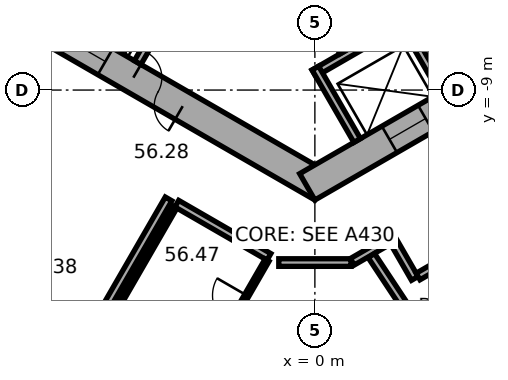
"""IFC4 building model, lengths in metres.
Left out: names, types, materials, properties, quantities, classifications, styles, units other than length and angle.
Written with IfcOpenShell. Run it as: python <this file> out.ifc"""

import sys

from ifc_helpers import new_model, si_unit, direction, frame, frame_2d, origin, place, context, subcontext, project, spatial, rectangle, extrude, element, fill, save


model = new_model("IFC4")
c1 = context("Model", 3, precision=1e-05, world=origin(), true_north=direction((0.0, 1.0)))
c2 = subcontext(c1, "Body", "Model", "MODEL_VIEW")
j1 = project(units=[si_unit("LENGTHUNIT", "METRE"), si_unit("PLANEANGLEUNIT", "RADIAN")], contexts=[c1])
p1 = place(None, origin())
s1 = spatial("IfcSite", under=j1, at=p1, CompositionType="ELEMENT")
p2 = place(p1, origin())
s2 = spatial("IfcBuilding", under=s1, at=p2, CompositionType="ELEMENT")
p3 = place(p2, frame((0.0, 0.0, 229.1)))
s3 = spatial("IfcBuildingStorey", under=s2, at=p3, CompositionType="ELEMENT", Elevation=229.1)
p4 = place(p3, frame((-10.1, -5.6, 0.0), z_axis=(0.0, 0.0, 1.0), x_axis=(0.866023897231, -0.500002609418, 0.0)))
e1 = element("IfcWall", 1, at=p4, inside=s3, PredefinedType="SHEAR", context=c2, shape_type="SweptSolid", body=[
    extrude(rectangle(XDim=11.894, YDim=0.8, at=frame_2d((5.947, 0.0))), origin(), (0.0, 0.0, 1.0), 3.7),
])
p5 = place(p4, frame((6.147, 0.0, 0.0)))
e2 = element("IfcOpeningElement", 2, at=p5, cuts=e1, PredefinedType="OPENING", context=c2, shape_type="SweptSolid", body=[
    extrude(rectangle(XDim=1.5, YDim=2.1, at=frame_2d((0.75, 1.05))), frame((0.0, 0.41, 0.0), z_axis=(0.0, -1.0, 0.0), x_axis=(1.0, 0.0, 0.0)), (0.0, 0.0, 1.0), 0.82),
])
p6 = place(p4, frame((1.597, 0.0, 0.0)))
e3 = element("IfcOpeningElement", 3, at=p6, cuts=e1, PredefinedType="OPENING", context=c2, shape_type="SweptSolid", body=[
    extrude(rectangle(XDim=1.1, YDim=2.1, at=frame_2d((0.55, 1.05))), frame((0.0, 0.41, 0.0), z_axis=(0.0, -1.0, 0.0), x_axis=(1.0, 0.0, 0.0)), (0.0, 0.0, 1.0), 0.82),
])
p7 = place(p4, frame((4.197, 0.0, 0.0)))
e4 = element("IfcOpeningElement", 4, at=p7, cuts=e1, PredefinedType="OPENING", context=c2, shape_type="SweptSolid", body=[
    extrude(rectangle(XDim=1.1, YDim=2.1, at=frame_2d((0.55, 1.05))), frame((0.0, 0.41, 0.0), z_axis=(0.0, -1.0, 0.0), x_axis=(1.0, 0.0, 0.0)), (0.0, 0.0, 1.0), 0.82),
])
p8 = place(p3, frame((-0.2, -11.547, 0.0), z_axis=(0.0, 0.0, 1.0), x_axis=(0.866023897231, 0.500002609418, 0.0)))
e5 = element("IfcWall", 5, at=p8, inside=s3, PredefinedType="SHEAR", context=c2, shape_type="SweptSolid", body=[
    extrude(rectangle(XDim=11.894, YDim=0.8, at=frame_2d((5.947, 0.0))), origin(), (0.0, 0.0, 1.0), 3.7),
])
p9 = place(p8, frame((2.497, 0.0, 0.0)))
e6 = element("IfcOpeningElement", 6, at=p9, cuts=e5, PredefinedType="OPENING", context=c2, shape_type="SweptSolid", body=[
    extrude(rectangle(XDim=1.1, YDim=2.1, at=frame_2d((0.55, 1.05))), frame((0.0, 0.41, 0.0), z_axis=(0.0, -1.0, 0.0), x_axis=(1.0, 0.0, 0.0)), (0.0, 0.0, 1.0), 0.82),
])
p10 = place(p8, frame((5.097, 0.0, 0.0)))
e7 = element("IfcOpeningElement", 7, at=p10, cuts=e5, PredefinedType="OPENING", context=c2, shape_type="SweptSolid", body=[
    extrude(rectangle(XDim=1.1, YDim=2.1, at=frame_2d((0.55, 1.05))), frame((0.0, 0.41, 0.0), z_axis=(0.0, -1.0, 0.0), x_axis=(1.0, 0.0, 0.0)), (0.0, 0.0, 1.0), 0.82),
])
p11 = place(p8, frame((7.697, 0.0, 0.0)))
e8 = element("IfcOpeningElement", 8, at=p11, cuts=e5, PredefinedType="OPENING", context=c2, shape_type="SweptSolid", body=[
    extrude(rectangle(XDim=1.1, YDim=2.1, at=frame_2d((0.55, 1.05))), frame((0.0, 0.41, 0.0), z_axis=(0.0, -1.0, 0.0), x_axis=(1.0, 0.0, 0.0)), (0.0, 0.0, 1.0), 0.82),
])
p12 = place(p3, frame((-17.664, -13.415, 0.0), z_axis=(0.0, 0.0, 1.0), x_axis=(0.866026555358, -0.49999800541, 0.0)))
e9 = element("IfcWall", 9, at=p12, inside=s3, PredefinedType="STANDARD", context=c2, shape_type="SweptSolid", body=[
    extrude(rectangle(XDim=18.841, YDim=0.2, at=frame_2d((9.421, 0.0))), origin(), (0.0, 0.0, 1.0), 3.7),
])
p13 = place(p12, frame((1.254, 0.0, 0.9)))
e10 = element("IfcOpeningElement", 10, at=p13, cuts=e9, PredefinedType="OPENING", context=c2, shape_type="SweptSolid", body=[
    extrude(rectangle(XDim=2.2, YDim=2.0, at=frame_2d((1.1, 1.0))), frame((0.0, 0.11, 0.0), z_axis=(0.0, -1.0, 0.0), x_axis=(1.0, 0.0, 0.0)), (0.0, 0.0, 1.0), 0.22),
])
p14 = place(p12, frame((4.788, 0.0, 0.9)))
e11 = element("IfcOpeningElement", 11, at=p14, cuts=e9, PredefinedType="OPENING", context=c2, shape_type="SweptSolid", body=[
    extrude(rectangle(XDim=2.2, YDim=2.0, at=frame_2d((1.1, 1.0))), frame((0.0, 0.11, 0.0), z_axis=(0.0, -1.0, 0.0), x_axis=(1.0, 0.0, 0.0)), (0.0, 0.0, 1.0), 0.22),
])
p15 = place(p12, frame((8.322, 0.0, 0.9)))
e12 = element("IfcOpeningElement", 12, at=p15, cuts=e9, PredefinedType="OPENING", context=c2, shape_type="SweptSolid", body=[
    extrude(rectangle(XDim=2.2, YDim=2.0, at=frame_2d((1.1, 1.0))), frame((0.0, 0.11, 0.0), z_axis=(0.0, -1.0, 0.0), x_axis=(1.0, 0.0, 0.0)), (0.0, 0.0, 1.0), 0.22),
])
p16 = place(p12, frame((11.855, 0.0, 0.9)))
e13 = element("IfcOpeningElement", 13, at=p16, cuts=e9, PredefinedType="OPENING", context=c2, shape_type="SweptSolid", body=[
    extrude(rectangle(XDim=2.2, YDim=2.0, at=frame_2d((1.1, 1.0))), frame((0.0, 0.11, 0.0), z_axis=(0.0, -1.0, 0.0), x_axis=(1.0, 0.0, 0.0)), (0.0, 0.0, 1.0), 0.22),
])
p17 = place(p12, frame((15.389, 0.0, 0.9)))
e14 = element("IfcOpeningElement", 14, at=p17, cuts=e9, PredefinedType="OPENING", context=c2, shape_type="SweptSolid", body=[
    extrude(rectangle(XDim=2.2, YDim=2.0, at=frame_2d((1.1, 1.0))), frame((0.0, 0.11, 0.0), z_axis=(0.0, -1.0, 0.0), x_axis=(1.0, 0.0, 0.0)), (0.0, 0.0, 1.0), 0.22),
])
p18 = place(p3, frame((2.739, -22.711, 0.0), z_axis=(0.0, 0.0, 1.0), x_axis=(0.833885723098, 0.551937134838, 0.0)))
e15 = element("IfcWall", 15, at=p18, inside=s3, PredefinedType="STANDARD", context=c2, shape_type="SweptSolid", body=[
    extrude(rectangle(XDim=18.841, YDim=0.2, at=frame_2d((9.421, 0.0))), origin(), (0.0, 0.0, 1.0), 3.7),
])
p19 = place(p18, frame((1.252, 0.0, 0.9)))
e16 = element("IfcOpeningElement", 16, at=p19, cuts=e15, PredefinedType="OPENING", context=c2, shape_type="SweptSolid", body=[
    extrude(rectangle(XDim=2.2, YDim=2.0, at=frame_2d((1.1, 1.0))), frame((0.0, 0.11, 0.0), z_axis=(0.0, -1.0, 0.0), x_axis=(1.0, 0.0, 0.0)), (0.0, 0.0, 1.0), 0.22),
])
p20 = place(p18, frame((4.786, 0.0, 0.9)))
e17 = element("IfcOpeningElement", 17, at=p20, cuts=e15, PredefinedType="OPENING", context=c2, shape_type="SweptSolid", body=[
    extrude(rectangle(XDim=2.2, YDim=2.0, at=frame_2d((1.1, 1.0))), frame((0.0, 0.11, 0.0), z_axis=(0.0, -1.0, 0.0), x_axis=(1.0, 0.0, 0.0)), (0.0, 0.0, 1.0), 0.22),
])
p21 = place(p18, frame((8.32, 0.0, 0.9)))
e18 = element("IfcOpeningElement", 18, at=p21, cuts=e15, PredefinedType="OPENING", context=c2, shape_type="SweptSolid", body=[
    extrude(rectangle(XDim=2.2, YDim=2.0, at=frame_2d((1.1, 1.0))), frame((0.0, 0.11, 0.0), z_axis=(0.0, -1.0, 0.0), x_axis=(1.0, 0.0, 0.0)), (0.0, 0.0, 1.0), 0.22),
])
p22 = place(p18, frame((11.854, 0.0, 0.9)))
e19 = element("IfcOpeningElement", 19, at=p22, cuts=e15, PredefinedType="OPENING", context=c2, shape_type="SweptSolid", body=[
    extrude(rectangle(XDim=2.2, YDim=2.0, at=frame_2d((1.1, 1.0))), frame((0.0, 0.11, 0.0), z_axis=(0.0, -1.0, 0.0), x_axis=(1.0, 0.0, 0.0)), (0.0, 0.0, 1.0), 0.22),
])
p23 = place(p18, frame((15.387, 0.0, 0.9)))
e20 = element("IfcOpeningElement", 20, at=p23, cuts=e15, PredefinedType="OPENING", context=c2, shape_type="SweptSolid", body=[
    extrude(rectangle(XDim=2.2, YDim=2.0, at=frame_2d((1.1, 1.0))), frame((0.0, 0.11, 0.0), z_axis=(0.0, -1.0, 0.0), x_axis=(1.0, 0.0, 0.0)), (0.0, 0.0, 1.0), 0.22),
])
p24 = place(p3, frame((-3.563, -6.372, 0.0), z_axis=(0.0, 0.0, 1.0), x_axis=(-0.499994660107, -0.866028486751, 0.0)))
e21 = element("IfcWall", 21, at=p24, inside=s3, PredefinedType="PARTITIONING", context=c2, shape_type="SweptSolid", body=[
    extrude(rectangle(XDim=2.2, YDim=0.2, at=frame_2d((1.1, 0.0))), origin(), (0.0, 0.0, 1.0), 3.42),
])
p25 = place(p3, frame((-0.024, -8.559, 0.0), z_axis=(0.0, 0.0, 1.0), x_axis=(0.866026010844, 0.49999894854, 0.0)))
e22 = element("IfcWall", 22, at=p25, inside=s3, PredefinedType="PARTITIONING", context=c2, shape_type="SweptSolid", body=[
    extrude(rectangle(XDim=8.0, YDim=0.2, at=frame_2d((4.0, 0.0))), origin(), (0.0, 0.0, 1.0), 3.42),
])
for number, where, z_axis, x_axis in (
    (23, (0.013, -8.422, 0.0), (0.0, 0.0, 1.0), (0.5, -0.866, 0.0)),
    (24, (2.264, -7.122, 0.0), (0.0, 0.0, 1.0), (0.5, -0.866, 0.0)),
):
    element("IfcWall", number, at=place(p3, frame(where, z_axis=z_axis, x_axis=x_axis)), inside=s3, PredefinedType="PARTITIONING", context=c2, shape_type="SweptSolid", body=[
        extrude(rectangle(XDim=2.2, YDim=0.2, at=frame_2d((1.1, 0.0))), origin(), (0.0, 0.0, 1.0), 3.42),
    ])
p26 = place(p3, frame((-1.558, -3.902, 0.0), z_axis=(0.0, 0.0, 1.0), x_axis=(0.499977259774, -0.866038532462, 0.0)))
e25 = element("IfcWall", 25, at=p26, inside=s3, PredefinedType="SHEAR", context=c2, shape_type="SweptSolid", body=[
    extrude(rectangle(XDim=4.7, YDim=0.3, at=frame_2d((2.35, 0.0))), origin(), (0.0, 0.0, 1.0), 3.42),
])
p27 = place(p26, frame((0.8, 0.0, 0.0)))
e26 = element("IfcOpeningElement", 26, at=p27, cuts=e25, PredefinedType="OPENING", context=c2, shape_type="SweptSolid", body=[
    extrude(rectangle(XDim=1.2, YDim=2.1, at=frame_2d((0.6, 1.05))), frame((0.0, 0.16, 0.0), z_axis=(0.0, -1.0, 0.0), x_axis=(1.0, 0.0, 0.0)), (0.0, 0.0, 1.0), 0.32),
])
p28 = place(p3, frame((-7.525, -18.23, 0.0), z_axis=(0.0, 0.0, 1.0), x_axis=(0.499983153418, 0.866035129944, 0.0)))
e27 = element("IfcWall", 27, at=p28, inside=s3, PredefinedType="PARTITIONING", context=c2, shape_type="SweptSolid", body=[
    extrude(rectangle(XDim=7.35, YDim=0.2, at=frame_2d((3.675, 0.0))), origin(), (0.0, 0.0, 1.0), 3.42),
])
p29 = place(p28, frame((2.975, 0.0, 0.0)))
e28 = element("IfcOpeningElement", 28, at=p29, cuts=e27, PredefinedType="OPENING", context=c2, shape_type="SweptSolid", body=[
    extrude(rectangle(XDim=1.0, YDim=2.1, at=frame_2d((0.5, 1.05))), frame((0.0, 0.11, 0.0), z_axis=(0.0, -1.0, 0.0), x_axis=(1.0, 0.0, 0.0)), (0.0, 0.0, 1.0), 0.22),
])
p30 = place(p3, frame((-5.233, -14.761, 0.0), z_axis=(0.0, 0.0, 1.0), x_axis=(0.499967891604, 0.866043940782, 0.0)))
e29 = element("IfcWall", 29, at=p30, inside=s3, PredefinedType="PARTITIONING", context=c2, shape_type="SweptSolid", body=[
    extrude(rectangle(XDim=3.1, YDim=0.12, at=frame_2d((1.55, 0.0))), origin(), (0.0, 0.0, 1.0), 3.42),
])
p31 = place(p3, frame((-3.634, -11.99, 0.0), z_axis=(0.0, 0.0, 1.0), x_axis=(0.866018616679, -0.500011755427, 0.0)))
e30 = element("IfcWall", 30, at=p31, inside=s3, PredefinedType="PARTITIONING", context=c2, shape_type="SweptSolid", body=[
    extrude(rectangle(XDim=2.8, YDim=0.2, at=frame_2d((1.4, 0.0))), origin(), (0.0, 0.0, 1.0), 3.42),
])
p32 = place(p3, frame((-1.259, -13.476, 0.0), z_axis=(0.0, 0.0, 1.0), x_axis=(-0.500026023896, -0.86601037836, 0.0)))
e31 = element("IfcWall", 31, at=p32, inside=s3, PredefinedType="PARTITIONING", context=c2, shape_type="SweptSolid", body=[
    extrude(rectangle(XDim=3.04, YDim=0.12, at=frame_2d((1.52, 0.0))), origin(), (0.0, 0.0, 1.0), 3.42),
])
p33 = place(p32, frame((1.07, 0.0, 0.0)))
e32 = element("IfcOpeningElement", 32, at=p33, cuts=e31, PredefinedType="OPENING", context=c2, shape_type="SweptSolid", body=[
    extrude(rectangle(XDim=0.9, YDim=2.1, at=frame_2d((0.45, 1.05))), frame((0.0, 0.07, 0.0), z_axis=(0.0, -1.0, 0.0), x_axis=(1.0, 0.0, 0.0)), (0.0, 0.0, 1.0), 0.14),
])
p34 = place(p3, frame((-0.95, -13.539, 0.0), z_axis=(0.0, 0.0, 1.0), x_axis=(1.0, 0.0, 0.0)))
e33 = element("IfcWall", 33, at=p34, inside=s3, PredefinedType="PARTITIONING", context=c2, shape_type="SweptSolid", body=[
    extrude(rectangle(XDim=1.9, YDim=0.2, at=frame_2d((0.95, 0.0))), origin(), (0.0, 0.0, 1.0), 3.42),
])
p35 = place(p3, frame((0.985, -13.519, 0.0), z_axis=(0.0, 0.0, 1.0), x_axis=(0.866054082991, 0.499950322867, 0.0)))
e34 = element("IfcWall", 34, at=p35, inside=s3, PredefinedType="PARTITIONING", context=c2, shape_type="SweptSolid", body=[
    extrude(rectangle(XDim=1.206, YDim=0.2, at=frame_2d((0.603, 0.0))), origin(), (0.0, 0.0, 1.0), 3.42),
])
p36 = place(p3, frame((2.079, -13.003, 0.0), z_axis=(0.0, 0.0, 1.0), x_axis=(0.500074377092, -0.865982457891, 0.0)))
e35 = element("IfcWall", 35, at=p36, inside=s3, PredefinedType="PARTITIONING", context=c2, shape_type="SweptSolid", body=[
    extrude(rectangle(XDim=1.101, YDim=0.2, at=frame_2d((0.55, 0.0))), origin(), (0.0, 0.0, 1.0), 3.42),
])
p37 = place(p3, frame((2.716, -13.906, 0.0), z_axis=(0.0, 0.0, 1.0), x_axis=(0.866040290674, 0.499974214264, 0.0)))
e36 = element("IfcWall", 36, at=p37, inside=s3, PredefinedType="PARTITIONING", context=c2, shape_type="SweptSolid", body=[
    extrude(rectangle(XDim=8.702, YDim=0.2, at=frame_2d((4.351, 0.0))), origin(), (0.0, 0.0, 1.0), 3.42),
])
p38 = place(p37, frame((2.679, 0.0, 0.0)))
e37 = element("IfcOpeningElement", 37, at=p38, cuts=e36, PredefinedType="OPENING", context=c2, shape_type="SweptSolid", body=[
    extrude(rectangle(XDim=1.0, YDim=2.1, at=frame_2d((0.5, 1.05))), frame((0.0, 0.11, 0.0), z_axis=(0.0, -1.0, 0.0), x_axis=(1.0, 0.0, 0.0)), (0.0, 0.0, 1.0), 0.22),
])
p39 = place(p3, frame((5.677, -19.687, 0.0), z_axis=(0.0, 0.0, 1.0), x_axis=(-0.551936619203, 0.833886064389, 0.0)))
e38 = element("IfcWall", 38, at=p39, inside=s3, PredefinedType="PARTITIONING", context=c2, shape_type="SweptSolid", body=[
    extrude(rectangle(XDim=7.592, YDim=0.2, at=frame_2d((3.796, 0.0))), origin(), (0.0, 0.0, 1.0), 3.42),
])
p40 = place(p5, origin())
e39 = element("IfcDoor", 39, at=p40, inside=s3, OperationType="DOUBLE_DOOR_SINGLE_SWING", PredefinedType="DOOR", context=c2, shape_type="SweptSolid", body=[
    extrude(rectangle(XDim=1.5, YDim=2.1, at=frame_2d((0.75, 1.05))), frame((0.0, 0.025, 0.0), z_axis=(0.0, -1.0, 0.0), x_axis=(1.0, 0.0, 0.0)), (0.0, 0.0, 1.0), 0.05),
])
fill(e2, e39)
p41 = place(p7, origin())
e40 = element("IfcDoor", 40, at=p41, inside=s3, OperationType="DOUBLE_DOOR_SLIDING", PredefinedType="DOOR", context=c2, shape_type="SweptSolid", body=[
    extrude(rectangle(XDim=1.1, YDim=2.1, at=frame_2d((0.55, 1.05))), frame((0.0, 0.025, 0.0), z_axis=(0.0, -1.0, 0.0), x_axis=(1.0, 0.0, 0.0)), (0.0, 0.0, 1.0), 0.05),
])
fill(e4, e40)
p42 = place(p9, origin())
e41 = element("IfcDoor", 41, at=p42, inside=s3, OperationType="DOUBLE_DOOR_SLIDING", PredefinedType="DOOR", context=c2, shape_type="SweptSolid", body=[
    extrude(rectangle(XDim=1.1, YDim=2.1, at=frame_2d((0.55, 1.05))), frame((0.0, 0.025, 0.0), z_axis=(0.0, -1.0, 0.0), x_axis=(1.0, 0.0, 0.0)), (0.0, 0.0, 1.0), 0.05),
])
fill(e6, e41)
p43 = place(p33, origin())
e42 = element("IfcDoor", 42, at=p43, inside=s3, OperationType="SINGLE_SWING_LEFT", PredefinedType="DOOR", context=c2, shape_type="SweptSolid", body=[
    extrude(rectangle(XDim=0.9, YDim=2.1, at=frame_2d((0.45, 1.05))), frame((0.0, 0.025, 0.0), z_axis=(0.0, -1.0, 0.0), x_axis=(1.0, 0.0, 0.0)), (0.0, 0.0, 1.0), 0.05),
])
fill(e32, e42)
save(model, sys.argv[1])
